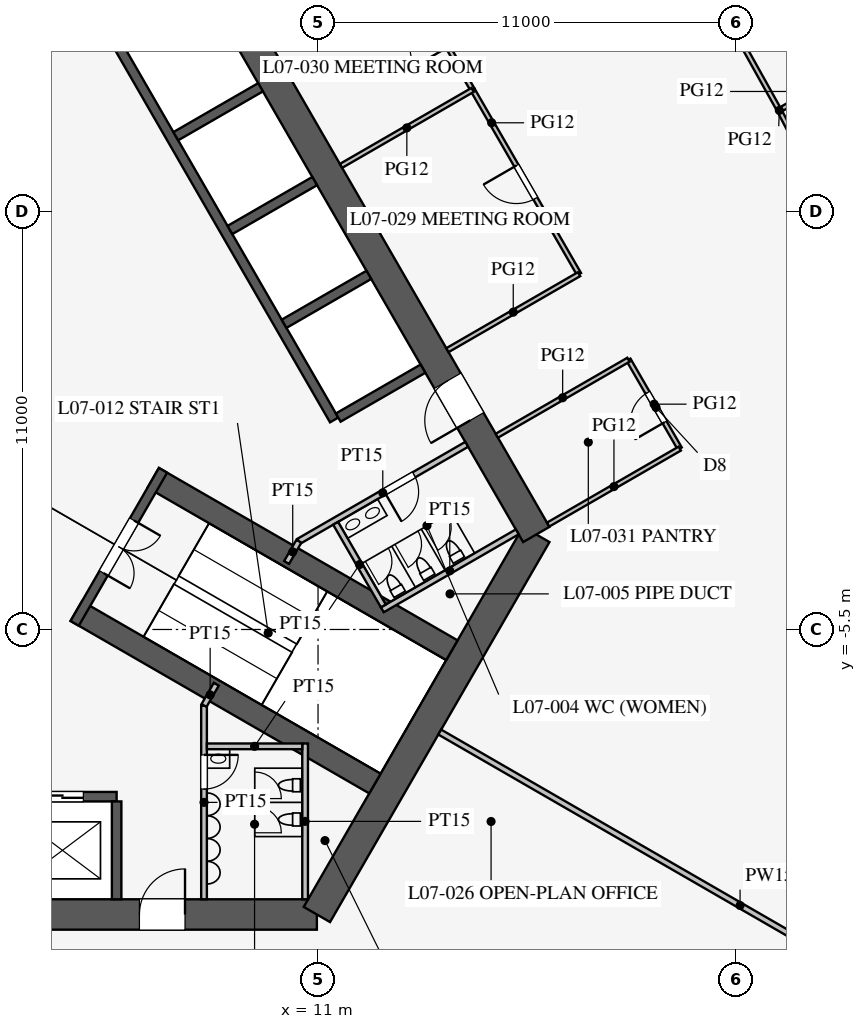
"""IFC4 building model, lengths in metres.
Left out: names, types, materials, properties, quantities, classifications, styles, units other than length and angle.
Written with IfcOpenShell. Run it as: python <this file> out.ifc"""

import sys

from ifc_helpers import new_model, si_unit, direction, frame, frame_2d, origin, place, context, subcontext, project, spatial, rectangle, extrude, element, fill, save


model = new_model("IFC4")
c1 = context("Model", 3, precision=1e-05, world=origin(), true_north=direction((0.0, 1.0)))
c2 = subcontext(c1, "Body", "Model", "MODEL_VIEW")
j1 = project(units=[si_unit("LENGTHUNIT", "METRE"), si_unit("PLANEANGLEUNIT", "RADIAN")], contexts=[c1])
p1 = place(None, origin())
s1 = spatial("IfcSite", under=j1, at=p1, CompositionType="ELEMENT")
p2 = place(p1, origin())
s2 = spatial("IfcBuilding", under=s1, at=p2, CompositionType="ELEMENT")
p3 = place(p2, frame((0.0, 0.0, 33.3)))
s3 = spatial("IfcBuildingStorey", under=s2, at=p3, CompositionType="ELEMENT", Elevation=33.3)
p4 = place(p3, frame((-10.97, -13.0, 0.0), z_axis=(0.0, 0.0, 1.0), x_axis=(1.0, 0.0, 0.0)))
e1 = element("IfcWall", 1, at=p4, inside=s3, PredefinedType="SHEAR", context=c2, shape_type="SweptSolid", body=[
    extrude(rectangle(XDim=21.939, YDim=0.8, at=frame_2d((10.97, 0.0))), origin(), (0.0, 0.0, 1.0), 4.2),
])
p5 = place(p4, frame((17.27, 0.0, 0.0)))
e2 = element("IfcOpeningElement", 2, at=p5, cuts=e1, PredefinedType="OPENING", context=c2, shape_type="SweptSolid", body=[
    extrude(rectangle(XDim=1.2, YDim=2.1, at=frame_2d((0.6, 1.05))), frame((0.0, 0.41, 0.0), z_axis=(0.0, -1.0, 0.0), x_axis=(1.0, 0.0, 0.0)), (0.0, 0.0, 1.0), 0.82),
])
p6 = place(p4, frame((3.47, 0.0, 0.0)))
e3 = element("IfcOpeningElement", 3, at=p6, cuts=e1, PredefinedType="OPENING", context=c2, shape_type="SweptSolid", body=[
    extrude(rectangle(XDim=1.2, YDim=2.1, at=frame_2d((0.6, 1.05))), frame((0.0, 0.41, 0.0), z_axis=(0.0, -1.0, 0.0), x_axis=(1.0, 0.0, 0.0)), (0.0, 0.0, 1.0), 0.82),
])
p7 = place(p3, frame((10.97, -13.0, 0.0), z_axis=(0.0, 0.0, 1.0), x_axis=(0.499995765644, 0.866027848477, 0.0)))
e4 = element("IfcWall", 4, at=p7, inside=s3, PredefinedType="SHEAR", context=c2, shape_type="SweptSolid", body=[
    extrude(rectangle(XDim=11.547, YDim=0.8, at=frame_2d((5.773, 0.0))), origin(), (0.0, 0.0, 1.0), 4.2),
])
p8 = place(p3, frame((16.743, -3.0, 0.0), z_axis=(0.0, 0.0, 1.0), x_axis=(-0.500002442456, 0.866023993627, 0.0)))
e5 = element("IfcWall", 5, at=p8, inside=s3, PredefinedType="SHEAR", context=c2, shape_type="SweptSolid", body=[
    extrude(rectangle(XDim=21.939, YDim=0.8, at=frame_2d((10.97, 0.0))), origin(), (0.0, 0.0, 1.0), 4.2),
])
p9 = place(p8, frame((17.27, 0.0, 0.0)))
e6 = element("IfcOpeningElement", 6, at=p9, cuts=e5, PredefinedType="OPENING", context=c2, shape_type="SweptSolid", body=[
    extrude(rectangle(XDim=1.2, YDim=2.1, at=frame_2d((0.6, 1.05))), frame((0.0, 0.41, 0.0), z_axis=(0.0, -1.0, 0.0), x_axis=(1.0, 0.0, 0.0)), (0.0, 0.0, 1.0), 0.82),
])
p10 = place(p8, frame((3.47, 0.0, 0.0)))
e7 = element("IfcOpeningElement", 7, at=p10, cuts=e5, PredefinedType="OPENING", context=c2, shape_type="SweptSolid", body=[
    extrude(rectangle(XDim=1.2, YDim=2.1, at=frame_2d((0.6, 1.05))), frame((0.0, 0.41, 0.0), z_axis=(0.0, -1.0, 0.0), x_axis=(1.0, 0.0, 0.0)), (0.0, 0.0, 1.0), 0.82),
])
p11 = place(p3, frame((-5.7, -9.9, 0.0), z_axis=(0.0, 0.0, 1.0), x_axis=(1.0, 0.0, 0.0)))
e8 = element("IfcWall", 8, at=p11, inside=s3, PredefinedType="SHEAR", context=c2, shape_type="SweptSolid", body=[
    extrude(rectangle(XDim=11.4, YDim=0.25, at=frame_2d((5.7, 0.0))), origin(), (0.0, 0.0, 1.0), 4.2),
])
p12 = place(p11, frame((0.875, 0.0, 0.0)))
e9 = element("IfcOpeningElement", 9, at=p12, cuts=e8, PredefinedType="OPENING", context=c2, shape_type="SweptSolid", body=[
    extrude(rectangle(XDim=1.1, YDim=2.2, at=frame_2d((0.55, 1.1))), frame((0.0, 0.135, 0.0), z_axis=(0.0, -1.0, 0.0), x_axis=(1.0, 0.0, 0.0)), (0.0, 0.0, 1.0), 0.27),
])
p13 = place(p11, frame((3.725, 0.0, 0.0)))
e10 = element("IfcOpeningElement", 10, at=p13, cuts=e8, PredefinedType="OPENING", context=c2, shape_type="SweptSolid", body=[
    extrude(rectangle(XDim=1.1, YDim=2.2, at=frame_2d((0.55, 1.1))), frame((0.0, 0.135, 0.0), z_axis=(0.0, -1.0, 0.0), x_axis=(1.0, 0.0, 0.0)), (0.0, 0.0, 1.0), 0.27),
])
p14 = place(p11, frame((6.575, 0.0, 0.0)))
e11 = element("IfcOpeningElement", 11, at=p14, cuts=e8, PredefinedType="OPENING", context=c2, shape_type="SweptSolid", body=[
    extrude(rectangle(XDim=1.1, YDim=2.2, at=frame_2d((0.55, 1.1))), frame((0.0, 0.135, 0.0), z_axis=(0.0, -1.0, 0.0), x_axis=(1.0, 0.0, 0.0)), (0.0, 0.0, 1.0), 0.27),
])
p15 = place(p11, frame((9.425, 0.0, 0.0)))
e12 = element("IfcOpeningElement", 12, at=p15, cuts=e8, PredefinedType="OPENING", context=c2, shape_type="SweptSolid", body=[
    extrude(rectangle(XDim=1.1, YDim=2.2, at=frame_2d((0.55, 1.1))), frame((0.0, 0.135, 0.0), z_axis=(0.0, -1.0, 0.0), x_axis=(1.0, 0.0, 0.0)), (0.0, 0.0, 1.0), 0.27),
])
p16 = place(p3, frame((5.7, -10.025, 0.0), z_axis=(0.0, 0.0, 1.0), x_axis=(0.0, -1.0, 0.0)))
e13 = element("IfcWall", 13, at=p16, inside=s3, PredefinedType="SHEAR", context=c2, shape_type="SweptSolid", body=[
    extrude(rectangle(XDim=2.575, YDim=0.25, at=frame_2d((1.288, 0.0))), origin(), (0.0, 0.0, 1.0), 4.2),
])
p17 = place(p3, frame((11.424, 0.014, 0.0), z_axis=(0.0, 0.0, 1.0), x_axis=(-0.500001763848, 0.866024385424, 0.0)))
e14 = element("IfcWall", 14, at=p17, inside=s3, PredefinedType="SHEAR", context=c2, shape_type="SweptSolid", body=[
    extrude(rectangle(XDim=11.4, YDim=0.25, at=frame_2d((5.7, 0.0))), origin(), (0.0, 0.0, 1.0), 4.2),
])
for number, where, z_axis, x_axis in (
    (15, (11.532, 0.076, 0.0), (0.0, 0.0, 1.0), (0.866, 0.5, 0.0)),
    (16, (10.107, 2.544, 0.0), (0.0, 0.0, 1.0), (0.866, 0.5, 0.0)),
    (17, (8.682, 5.012, 0.0), (0.0, 0.0, 1.0), (0.866, 0.5, 0.0)),
    (18, (7.257, 7.481, 0.0), (0.0, 0.0, 1.0), (0.866, 0.5, 0.0)),
):
    element("IfcWall", number, at=place(p3, frame(where, z_axis=z_axis, x_axis=x_axis)), inside=s3, PredefinedType="SHEAR", context=c2, shape_type="SweptSolid", body=[
        extrude(rectangle(XDim=2.575, YDim=0.25, at=frame_2d((1.288, 0.0))), origin(), (0.0, 0.0, 1.0), 4.2),
    ])
for number, where, z_axis, x_axis in (
    (19, (4.638, -5.016, 0.0), (0.0, 0.0, 1.0), (0.866, -0.5, 0.0)),
    (20, (6.663, -1.509, 0.0), (0.0, 0.0, 1.0), (0.866, -0.5, 0.0)),
):
    element("IfcWall", number, at=place(p3, frame(where, z_axis=z_axis, x_axis=x_axis)), inside=s3, PredefinedType="SHEAR", context=c2, shape_type="SweptSolid", body=[
        extrude(rectangle(XDim=9.075, YDim=0.6, at=frame_2d((4.538, 0.0))), origin(), (0.0, 0.0, 1.0), 4.2),
    ])
p18 = place(p3, frame((4.597, -5.339, 0.0), z_axis=(0.0, 0.0, 1.0), x_axis=(0.499984536904, 0.866034331223, 0.0)))
e21 = element("IfcWall", 21, at=p18, inside=s3, PredefinedType="SHEAR", context=c2, shape_type="SweptSolid", body=[
    extrude(rectangle(XDim=4.65, YDim=0.25, at=frame_2d((2.325, 0.0))), origin(), (0.0, 0.0, 1.0), 4.2),
])
p19 = place(p18, frame((1.525, 0.0, 0.0)))
e22 = element("IfcOpeningElement", 22, at=p19, cuts=e21, PredefinedType="OPENING", context=c2, shape_type="SweptSolid", body=[
    extrude(rectangle(XDim=1.6, YDim=2.1, at=frame_2d((0.8, 1.05))), frame((0.0, 0.135, 0.0), z_axis=(0.0, -1.0, 0.0), x_axis=(1.0, 0.0, 0.0)), (0.0, 0.0, 1.0), 0.27),
])
p20 = place(p3, frame((8.0, -7.5, 0.0), z_axis=(0.0, 0.0, 1.0), x_axis=(0.0, -1.0, 0.0)))
e23 = element("IfcWall", 23, at=p20, inside=s3, PredefinedType="PARTITIONING", context=c2, shape_type="SweptSolid", body=[
    extrude(rectangle(XDim=5.1, YDim=0.15, at=frame_2d((2.55, 0.0))), origin(), (0.0, 0.0, 1.0), 4.0),
])
p21 = place(p20, frame((1.3, 0.0, 0.0)))
e24 = element("IfcOpeningElement", 24, at=p21, cuts=e23, PredefinedType="OPENING", context=c2, shape_type="SweptSolid", body=[
    extrude(rectangle(XDim=0.9, YDim=2.1, at=frame_2d((0.45, 1.05))), frame((0.0, 0.085, 0.0), z_axis=(0.0, -1.0, 0.0), x_axis=(1.0, 0.0, 0.0)), (0.0, 0.0, 1.0), 0.17),
])
p22 = place(p3, frame((10.495, -3.178, 0.0), z_axis=(0.0, 0.0, 1.0), x_axis=(0.86602216432, 0.500005610874, 0.0)))
e25 = element("IfcWall", 25, at=p22, inside=s3, PredefinedType="PARTITIONING", context=c2, shape_type="SweptSolid", body=[
    extrude(rectangle(XDim=5.1, YDim=0.15, at=frame_2d((2.55, 0.0))), origin(), (0.0, 0.0, 1.0), 4.0),
])
p23 = place(p22, frame((2.6, 0.0, 0.0)))
e26 = element("IfcOpeningElement", 26, at=p23, cuts=e25, PredefinedType="OPENING", context=c2, shape_type="SweptSolid", body=[
    extrude(rectangle(XDim=0.9, YDim=2.1, at=frame_2d((0.45, 1.05))), frame((0.0, 0.085, 0.0), z_axis=(0.0, -1.0, 0.0), x_axis=(1.0, 0.0, 0.0)), (0.0, 0.0, 1.0), 0.17),
])
for number, where, z_axis, x_axis in (
    (27, (8.0, -7.5, 0.0), (0.0, 0.0, 1.0), (0.5, 0.866, 0.0)),
    (28, (10.495, -3.178, 0.0), (0.0, 0.0, 1.0), (-0.5, -0.866, 0.0)),
):
    element("IfcWall", number, at=place(p3, frame(where, z_axis=z_axis, x_axis=x_axis)), inside=s3, PredefinedType="PARTITIONING", context=c2, shape_type="SweptSolid", body=[
        extrude(rectangle(XDim=0.645, YDim=0.15, at=frame_2d((0.323, 0.0))), origin(), (0.0, 0.0, 1.0), 4.0),
    ])
p24 = place(p3, frame((10.66, -8.5, 0.0), z_axis=(0.0, 0.0, 1.0), x_axis=(0.0, -1.0, 0.0)))
e29 = element("IfcWall", 29, at=p24, inside=s3, PredefinedType="PARTITIONING", context=c2, shape_type="SweptSolid", body=[
    extrude(rectangle(XDim=4.1, YDim=0.15, at=frame_2d((2.05, 0.0))), origin(), (0.0, 0.0, 1.0), 4.0),
])
p25 = place(p3, frame((8.075, -8.575, 0.0), z_axis=(0.0, 0.0, 1.0), x_axis=(1.0, 0.0, 0.0)))
e30 = element("IfcWall", 30, at=p25, inside=s3, PredefinedType="PARTITIONING", context=c2, shape_type="SweptSolid", body=[
    extrude(rectangle(XDim=2.51, YDim=0.15, at=frame_2d((1.255, 0.0))), origin(), (0.0, 0.0, 1.0), 4.0),
])
p26 = place(p3, frame((12.691, -4.982, 0.0), z_axis=(0.0, 0.0, 1.0), x_axis=(0.8660249478, 0.500000789788, 0.0)))
e31 = element("IfcWall", 31, at=p26, inside=s3, PredefinedType="PARTITIONING", context=c2, shape_type="SweptSolid", body=[
    extrude(rectangle(XDim=4.1, YDim=0.15, at=frame_2d((2.05, 0.0))), origin(), (0.0, 0.0, 1.0), 4.0),
])
p27 = place(p3, frame((11.464, -2.706, 0.0), z_axis=(0.0, 0.0, 1.0), x_axis=(0.50001992892, -0.866013897511, 0.0)))
e32 = element("IfcWall", 32, at=p27, inside=s3, PredefinedType="PARTITIONING", context=c2, shape_type="SweptSolid", body=[
    extrude(rectangle(XDim=2.51, YDim=0.15, at=frame_2d((1.255, 0.0))), origin(), (0.0, 0.0, 1.0), 4.0),
])
p28 = place(p3, frame((14.203, -8.2, 0.0), z_axis=(0.0, 0.0, 1.0), x_axis=(0.866024965723, -0.500000758745, 0.0)))
e33 = element("IfcWall", 33, at=p28, inside=s3, PredefinedType="PARTITIONING", context=c2, shape_type="SweptSolid", body=[
    extrude(rectangle(XDim=18.25, YDim=0.15, at=frame_2d((9.125, 0.0))), origin(), (0.0, 0.0, 1.0), 2.3),
])
p29 = place(p3, frame((15.069, 8.7, 0.0), z_axis=(0.0, 0.0, 1.0), x_axis=(-0.500012057535, 0.866018442252, 0.0)))
e34 = element("IfcWall", 34, at=p29, inside=s3, PredefinedType="PARTITIONING", context=c2, shape_type="SweptSolid", body=[
    extrude(rectangle(XDim=3.6, YDim=0.12, at=frame_2d((1.8, 0.0))), origin(), (0.0, 0.0, 1.0), 2.9),
])
p30 = place(p29, frame((1.3, 0.0, 0.15)))
e35 = element("IfcOpeningElement", 35, at=p30, cuts=e34, PredefinedType="OPENING", context=c2, shape_type="SweptSolid", body=[
    extrude(rectangle(XDim=1.0, YDim=2.1, at=frame_2d((0.5, 1.05))), frame((0.0, 0.07, 0.0), z_axis=(0.0, -1.0, 0.0), x_axis=(1.0, 0.0, 0.0)), (0.0, 0.0, 1.0), 0.14),
])
p31 = place(p3, frame((20.519, -0.74, 0.0), z_axis=(0.0, 0.0, 1.0), x_axis=(-0.4999416173, 0.866059108428, 0.0)))
e36 = element("IfcWall", 36, at=p31, inside=s3, PredefinedType="PARTITIONING", context=c2, shape_type="SweptSolid", body=[
    extrude(rectangle(XDim=2.7, YDim=0.12, at=frame_2d((1.35, 0.0))), origin(), (0.0, 0.0, 1.0), 2.9),
])
p32 = place(p31, frame((0.8, 0.0, 0.15)))
e37 = element("IfcOpeningElement", 37, at=p32, cuts=e36, PredefinedType="OPENING", context=c2, shape_type="SweptSolid", body=[
    extrude(rectangle(XDim=0.9, YDim=2.1, at=frame_2d((0.45, 1.05))), frame((0.0, 0.07, 0.0), z_axis=(0.0, -1.0, 0.0), x_axis=(1.0, 0.0, 0.0)), (0.0, 0.0, 1.0), 0.14),
])
p33 = place(p3, frame((17.869, 3.85, 0.0), z_axis=(0.0, 0.0, 1.0), x_axis=(-0.500016814911, 0.866015695474, 0.0)))
e38 = element("IfcWall", 38, at=p33, inside=s3, PredefinedType="PARTITIONING", context=c2, shape_type="SweptSolid", body=[
    extrude(rectangle(XDim=5.6, YDim=0.12, at=frame_2d((2.8, 0.0))), origin(), (0.0, 0.0, 1.0), 2.9),
])
p34 = place(p33, frame((2.3, 0.0, 0.15)))
e39 = element("IfcOpeningElement", 39, at=p34, cuts=e38, PredefinedType="OPENING", context=c2, shape_type="SweptSolid", body=[
    extrude(rectangle(XDim=1.0, YDim=2.1, at=frame_2d((0.5, 1.05))), frame((0.0, 0.07, 0.0), z_axis=(0.0, -1.0, 0.0), x_axis=(1.0, 0.0, 0.0)), (0.0, 0.0, 1.0), 0.14),
])
for number, where, z_axis, x_axis in (
    (40, (11.605, 6.7, 0.0), (0.0, 0.0, 1.0), (0.866, 0.5, 0.0)),
    (41, (17.055, -2.74, 0.0), (0.0, 0.0, 1.0), (0.866, 0.5, 0.0)),
    (42, (14.405, 1.85, 0.0), (0.0, 0.0, 1.0), (0.866, 0.5, 0.0)),
    (43, (15.705, -0.401, 0.0), (0.0, 0.0, 1.0), (0.866, 0.5, 0.0)),
):
    element("IfcWall", number, at=place(p3, frame(where, z_axis=z_axis, x_axis=x_axis)), inside=s3, PredefinedType="PARTITIONING", context=c2, shape_type="SweptSolid", body=[
        extrude(rectangle(XDim=4.0, YDim=0.12, at=frame_2d((2.0, 0.0))), origin(), (0.0, 0.0, 1.0), 2.9),
    ])
p35 = place(p3, frame((23.137, 8.162, 0.0), z_axis=(0.0, 0.0, 1.0), x_axis=(-0.487415216275, 0.87317031955, 0.0)))
e44 = element("IfcWall", 44, at=p35, inside=s3, PredefinedType="PARTITIONING", context=c2, shape_type="SweptSolid", body=[
    extrude(rectangle(XDim=4.5, YDim=0.12, at=frame_2d((2.25, 0.0))), origin(), (0.0, 0.0, 1.0), 2.9),
])
p36 = place(p35, frame((1.8, 0.0, 0.15)))
e45 = element("IfcOpeningElement", 45, at=p36, cuts=e44, PredefinedType="OPENING", context=c2, shape_type="SweptSolid", body=[
    extrude(rectangle(XDim=0.9, YDim=2.1, at=frame_2d((0.45, 1.05))), frame((0.0, 0.07, 0.0), z_axis=(0.0, -1.0, 0.0), x_axis=(1.0, 0.0, 0.0)), (0.0, 0.0, 1.0), 0.14),
])
p37 = place(p3, frame((25.217, 4.167, 0.0), z_axis=(0.0, 0.0, 1.0), x_axis=(-0.461810056307, 0.886978845235, 0.0)))
e46 = element("IfcWall", 46, at=p37, inside=s3, PredefinedType="PARTITIONING", context=c2, shape_type="SweptSolid", body=[
    extrude(rectangle(XDim=4.504, YDim=0.12, at=frame_2d((2.252, 0.0))), origin(), (0.0, 0.0, 1.0), 2.9),
])
p38 = place(p37, frame((1.8, 0.0, 0.15)))
e47 = element("IfcOpeningElement", 47, at=p38, cuts=e46, PredefinedType="OPENING", context=c2, shape_type="SweptSolid", body=[
    extrude(rectangle(XDim=0.9, YDim=2.1, at=frame_2d((0.45, 1.05))), frame((0.0, 0.07, 0.0), z_axis=(0.0, -1.0, 0.0), x_axis=(1.0, 0.0, 0.0)), (0.0, 0.0, 1.0), 0.14),
])
p39 = place(p3, frame((23.137, 8.162, 0.0), z_axis=(0.0, 0.0, 1.0), x_axis=(0.866023728021, 0.500002902497, 0.0)))
e48 = element("IfcWall", 48, at=p39, inside=s3, PredefinedType="PARTITIONING", context=c2, shape_type="SweptSolid", body=[
    extrude(rectangle(XDim=1.984, YDim=0.12, at=frame_2d((0.992, 0.0))), origin(), (0.0, 0.0, 1.0), 2.9),
])
p40 = place(p21, origin())
e49 = element("IfcDoor", 49, at=p40, inside=s3, OperationType="SINGLE_SWING_LEFT", PredefinedType="DOOR", context=c2, shape_type="SweptSolid", body=[
    extrude(rectangle(XDim=0.9, YDim=2.1, at=frame_2d((0.45, 1.05))), frame((0.0, 0.025, 0.0), z_axis=(0.0, -1.0, 0.0), x_axis=(1.0, 0.0, 0.0)), (0.0, 0.0, 1.0), 0.05),
])
fill(e24, e49)
p41 = place(p23, frame((0.9, 0.0, 0.0), z_axis=(0.0, 0.0, 1.0), x_axis=(-1.0, 0.0, 0.0)))
e50 = element("IfcDoor", 50, at=p41, inside=s3, OperationType="SINGLE_SWING_RIGHT", PredefinedType="DOOR", context=c2, shape_type="SweptSolid", body=[
    extrude(rectangle(XDim=0.9, YDim=2.1, at=frame_2d((0.45, 1.05))), frame((0.0, 0.025, 0.0), z_axis=(0.0, -1.0, 0.0), x_axis=(1.0, 0.0, 0.0)), (0.0, 0.0, 1.0), 0.05),
])
fill(e26, e50)
p42 = place(p19, frame((1.6, 0.0, 0.0), z_axis=(0.0, 0.0, 1.0), x_axis=(-1.0, 0.0, 0.0)))
e51 = element("IfcDoor", 51, at=p42, inside=s3, OperationType="DOUBLE_DOOR_SINGLE_SWING", PredefinedType="DOOR", context=c2, shape_type="SweptSolid", body=[
    extrude(rectangle(XDim=1.6, YDim=2.1, at=frame_2d((0.8, 1.05))), frame((0.0, 0.025, 0.0), z_axis=(0.0, -1.0, 0.0), x_axis=(1.0, 0.0, 0.0)), (0.0, 0.0, 1.0), 0.05),
])
fill(e22, e51)
p43 = place(p5, origin())
e52 = element("IfcDoor", 52, at=p43, inside=s3, OperationType="SINGLE_SWING_RIGHT", PredefinedType="DOOR", context=c2, shape_type="SweptSolid", body=[
    extrude(rectangle(XDim=1.2, YDim=2.1, at=frame_2d((0.6, 1.05))), frame((0.0, 0.025, 0.0), z_axis=(0.0, -1.0, 0.0), x_axis=(1.0, 0.0, 0.0)), (0.0, 0.0, 1.0), 0.05),
])
fill(e2, e52)
p44 = place(p10, origin())
e53 = element("IfcDoor", 53, at=p44, inside=s3, OperationType="SINGLE_SWING_LEFT", PredefinedType="DOOR", context=c2, shape_type="SweptSolid", body=[
    extrude(rectangle(XDim=1.2, YDim=2.1, at=frame_2d((0.6, 1.05))), frame((0.0, 0.025, 0.0), z_axis=(0.0, -1.0, 0.0), x_axis=(1.0, 0.0, 0.0)), (0.0, 0.0, 1.0), 0.05),
])
fill(e7, e53)
p45 = place(p34, origin())
e54 = element("IfcDoor", 54, at=p45, inside=s3, OperationType="SINGLE_SWING_RIGHT", PredefinedType="DOOR", context=c2, shape_type="SweptSolid", body=[
    extrude(rectangle(XDim=1.0, YDim=2.1, at=frame_2d((0.5, 1.05))), frame((0.0, 0.025, 0.0), z_axis=(0.0, -1.0, 0.0), x_axis=(1.0, 0.0, 0.0)), (0.0, 0.0, 1.0), 0.05),
])
fill(e39, e54)
p46 = place(p32, origin())
e55 = element("IfcDoor", 55, at=p46, inside=s3, OperationType="SINGLE_SWING_LEFT", PredefinedType="DOOR", context=c2, shape_type="SweptSolid", body=[
    extrude(rectangle(XDim=0.9, YDim=2.1, at=frame_2d((0.45, 1.05))), frame((0.0, 0.025, 0.0), z_axis=(0.0, -1.0, 0.0), x_axis=(1.0, 0.0, 0.0)), (0.0, 0.0, 1.0), 0.05),
])
fill(e37, e55)
p47 = place(p15, origin())
e56 = element("IfcDoor", 56, at=p47, inside=s3, OperationType="DOUBLE_DOOR_SLIDING", PredefinedType="DOOR", context=c2, shape_type="SweptSolid", body=[
    extrude(rectangle(XDim=1.1, YDim=2.2, at=frame_2d((0.55, 1.1))), frame((0.0, 0.025, 0.0), z_axis=(0.0, -1.0, 0.0), x_axis=(1.0, 0.0, 0.0)), (0.0, 0.0, 1.0), 0.05),
])
fill(e12, e56)
save(model, sys.argv[1])
